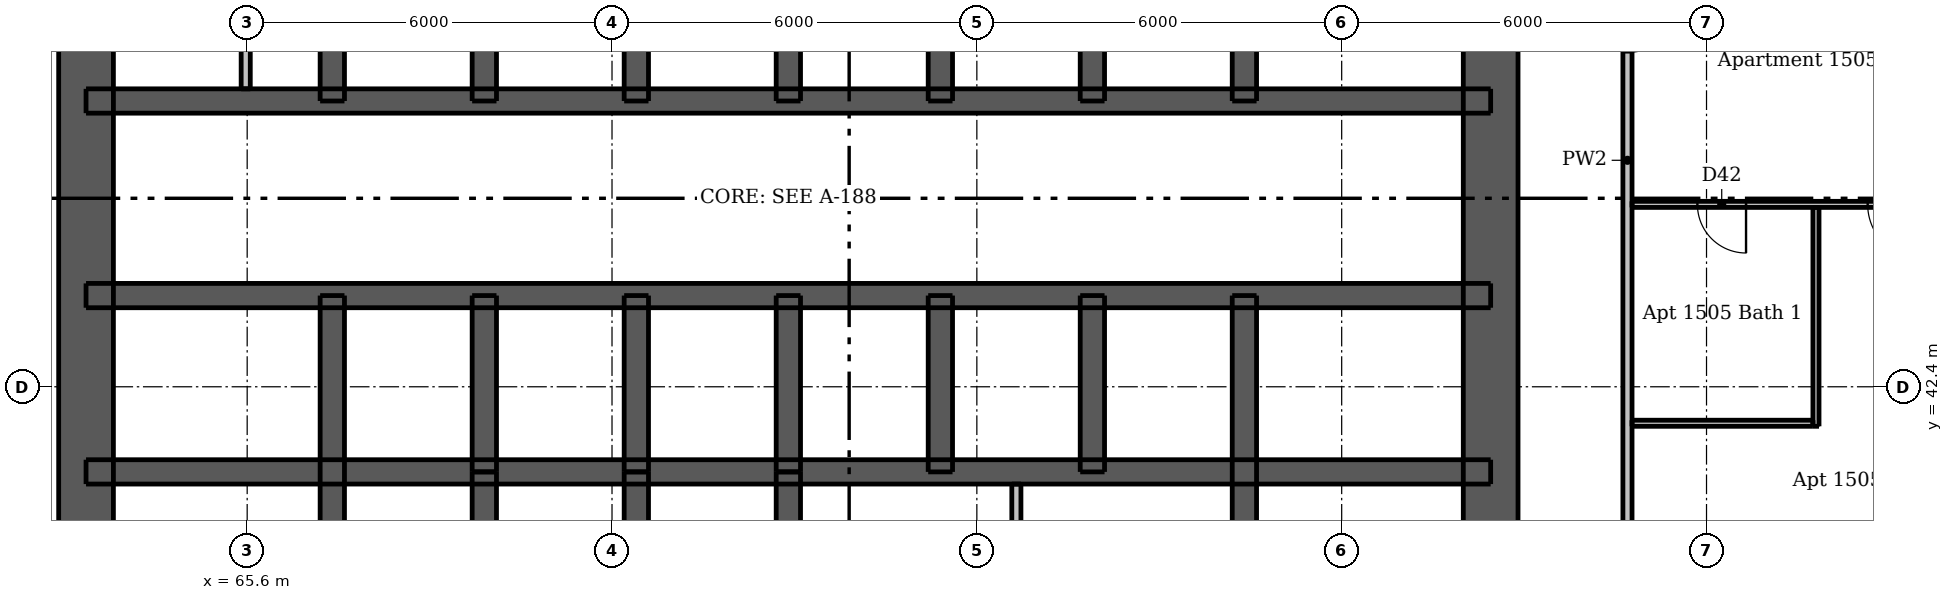
"""IFC4 building model, lengths in metres.
Left out: names, types, materials, properties, quantities, classifications, styles, units other than length and angle.
Written with IfcOpenShell. Run it as: python <this file> out.ifc"""

import sys

from ifc_helpers import new_model, si_unit, direction, frame, frame_2d, origin, place, context, subcontext, project, spatial, rectangle, extrude, element, fill, save


model = new_model("IFC4")
c1 = context("Model", 3, precision=1e-05, world=origin(), true_north=direction((0.0, 1.0)))
c2 = subcontext(c1, "Body", "Model", "MODEL_VIEW")
j1 = project(units=[si_unit("LENGTHUNIT", "METRE"), si_unit("PLANEANGLEUNIT", "RADIAN")], contexts=[c1])
p1 = place(None, origin())
s1 = spatial("IfcSite", under=j1, at=p1, CompositionType="ELEMENT")
p2 = place(p1, origin())
s2 = spatial("IfcBuilding", under=s1, at=p2, CompositionType="ELEMENT")
p3 = place(p2, frame((0.0, 0.0, 56.5)))
s3 = spatial("IfcBuildingStorey", under=s2, at=p3, CompositionType="ELEMENT", Elevation=56.5)
p4 = place(p3, frame((62.95, 33.5, 0.0), z_axis=(0.0, 0.0, 1.0), x_axis=(0.0, 1.0, 0.0)))
e1 = element("IfcWall", 1, at=p4, inside=s3, PredefinedType="SHEAR", context=c2, shape_type="SweptSolid", body=[
    extrude(rectangle(XDim=24.0, YDim=0.9, at=frame_2d((12.0, 0.0))), origin(), (0.0, 0.0, 1.0), 3.05),
])
p5 = place(p4, frame((11.2, 0.0, 0.0)))
e2 = element("IfcOpeningElement", 2, at=p5, cuts=e1, PredefinedType="OPENING", context=c2, shape_type="SweptSolid", body=[
    extrude(rectangle(XDim=1.6, YDim=2.1, at=frame_2d((0.8, 1.05))), frame((0.0, 0.46, 0.0), z_axis=(0.0, -1.0, 0.0), x_axis=(1.0, 0.0, 0.0)), (0.0, 0.0, 1.0), 0.92),
])
p6 = place(p3, frame((86.05, 33.5, 0.0), z_axis=(0.0, 0.0, 1.0), x_axis=(0.0, 1.0, 0.0)))
e3 = element("IfcWall", 3, at=p6, inside=s3, PredefinedType="SHEAR", context=c2, shape_type="SweptSolid", body=[
    extrude(rectangle(XDim=24.0, YDim=0.9, at=frame_2d((12.0, 0.0))), origin(), (0.0, 0.0, 1.0), 3.05),
])
p7 = place(p6, frame((11.2, 0.0, 0.0)))
e4 = element("IfcOpeningElement", 4, at=p7, cuts=e3, PredefinedType="OPENING", context=c2, shape_type="SweptSolid", body=[
    extrude(rectangle(XDim=1.6, YDim=2.1, at=frame_2d((0.8, 1.05))), frame((0.0, 0.46, 0.0), z_axis=(0.0, -1.0, 0.0), x_axis=(1.0, 0.0, 0.0)), (0.0, 0.0, 1.0), 0.92),
])
p8 = place(p3, frame((62.95, 41.0, 0.0), z_axis=(0.0, 0.0, 1.0), x_axis=(1.0, 0.0, 0.0)))
e5 = element("IfcWall", 5, at=p8, inside=s3, PredefinedType="SHEAR", context=c2, shape_type="SweptSolid", body=[
    extrude(rectangle(XDim=23.1, YDim=0.4, at=frame_2d((11.55, 0.0))), origin(), (0.0, 0.0, 1.0), 3.05),
])
p9 = place(p3, frame((62.95, 43.9, 0.0), z_axis=(0.0, 0.0, 1.0), x_axis=(1.0, 0.0, 0.0)))
e6 = element("IfcWall", 6, at=p9, inside=s3, PredefinedType="SHEAR", context=c2, shape_type="SweptSolid", body=[
    extrude(rectangle(XDim=23.1, YDim=0.4, at=frame_2d((11.55, 0.0))), origin(), (0.0, 0.0, 1.0), 3.05),
])
p10 = place(p9, frame((1.7, 0.0, 0.0)))
e7 = element("IfcOpeningElement", 7, at=p10, cuts=e6, PredefinedType="OPENING", context=c2, shape_type="SweptSolid", body=[
    extrude(rectangle(XDim=0.9, YDim=2.1, at=frame_2d((0.45, 1.05))), frame((0.0, 0.21, 0.0), z_axis=(0.0, -1.0, 0.0), x_axis=(1.0, 0.0, 0.0)), (0.0, 0.0, 1.0), 0.42),
])
p11 = place(p9, frame((20.5, 0.0, 0.0)))
e8 = element("IfcOpeningElement", 8, at=p11, cuts=e6, PredefinedType="OPENING", context=c2, shape_type="SweptSolid", body=[
    extrude(rectangle(XDim=0.9, YDim=2.1, at=frame_2d((0.45, 1.05))), frame((0.0, 0.21, 0.0), z_axis=(0.0, -1.0, 0.0), x_axis=(1.0, 0.0, 0.0)), (0.0, 0.0, 1.0), 0.42),
])
p12 = place(p9, frame((4.75, 0.0, 0.0)))
e9 = element("IfcOpeningElement", 9, at=p12, cuts=e6, PredefinedType="OPENING", context=c2, shape_type="SweptSolid", body=[
    extrude(rectangle(XDim=1.1, YDim=2.1, at=frame_2d((0.55, 1.05))), frame((0.0, 0.21, 0.0), z_axis=(0.0, -1.0, 0.0), x_axis=(1.0, 0.0, 0.0)), (0.0, 0.0, 1.0), 0.42),
])
p13 = place(p9, frame((7.25, 0.0, 0.0)))
e10 = element("IfcOpeningElement", 10, at=p13, cuts=e6, PredefinedType="OPENING", context=c2, shape_type="SweptSolid", body=[
    extrude(rectangle(XDim=1.1, YDim=2.1, at=frame_2d((0.55, 1.05))), frame((0.0, 0.21, 0.0), z_axis=(0.0, -1.0, 0.0), x_axis=(1.0, 0.0, 0.0)), (0.0, 0.0, 1.0), 0.42),
])
p14 = place(p9, frame((9.75, 0.0, 0.0)))
e11 = element("IfcOpeningElement", 11, at=p14, cuts=e6, PredefinedType="OPENING", context=c2, shape_type="SweptSolid", body=[
    extrude(rectangle(XDim=1.1, YDim=2.1, at=frame_2d((0.55, 1.05))), frame((0.0, 0.21, 0.0), z_axis=(0.0, -1.0, 0.0), x_axis=(1.0, 0.0, 0.0)), (0.0, 0.0, 1.0), 0.42),
])
p15 = place(p9, frame((12.25, 0.0, 0.0)))
e12 = element("IfcOpeningElement", 12, at=p15, cuts=e6, PredefinedType="OPENING", context=c2, shape_type="SweptSolid", body=[
    extrude(rectangle(XDim=1.1, YDim=2.1, at=frame_2d((0.55, 1.05))), frame((0.0, 0.21, 0.0), z_axis=(0.0, -1.0, 0.0), x_axis=(1.0, 0.0, 0.0)), (0.0, 0.0, 1.0), 0.42),
])
p16 = place(p9, frame((14.75, 0.0, 0.0)))
e13 = element("IfcOpeningElement", 13, at=p16, cuts=e6, PredefinedType="OPENING", context=c2, shape_type="SweptSolid", body=[
    extrude(rectangle(XDim=1.1, YDim=2.1, at=frame_2d((0.55, 1.05))), frame((0.0, 0.21, 0.0), z_axis=(0.0, -1.0, 0.0), x_axis=(1.0, 0.0, 0.0)), (0.0, 0.0, 1.0), 0.42),
])
p17 = place(p9, frame((17.25, 0.0, 0.0)))
e14 = element("IfcOpeningElement", 14, at=p17, cuts=e6, PredefinedType="OPENING", context=c2, shape_type="SweptSolid", body=[
    extrude(rectangle(XDim=1.1, YDim=2.1, at=frame_2d((0.55, 1.05))), frame((0.0, 0.21, 0.0), z_axis=(0.0, -1.0, 0.0), x_axis=(1.0, 0.0, 0.0)), (0.0, 0.0, 1.0), 0.42),
])
p18 = place(p3, frame((62.95, 47.1, 0.0), z_axis=(0.0, 0.0, 1.0), x_axis=(1.0, 0.0, 0.0)))
e15 = element("IfcWall", 15, at=p18, inside=s3, PredefinedType="SHEAR", context=c2, shape_type="SweptSolid", body=[
    extrude(rectangle(XDim=23.1, YDim=0.4, at=frame_2d((11.55, 0.0))), origin(), (0.0, 0.0, 1.0), 3.05),
])
p19 = place(p18, frame((1.088, 0.0, 0.0)))
e16 = element("IfcOpeningElement", 16, at=p19, cuts=e15, PredefinedType="OPENING", context=c2, shape_type="SweptSolid", body=[
    extrude(rectangle(XDim=0.9, YDim=2.1, at=frame_2d((0.45, 1.05))), frame((0.0, 0.21, 0.0), z_axis=(0.0, -1.0, 0.0), x_axis=(1.0, 0.0, 0.0)), (0.0, 0.0, 1.0), 0.42),
])
p20 = place(p18, frame((2.838, 0.0, 0.0)))
e17 = element("IfcOpeningElement", 17, at=p20, cuts=e15, PredefinedType="OPENING", context=c2, shape_type="SweptSolid", body=[
    extrude(rectangle(XDim=0.8, YDim=2.1, at=frame_2d((0.4, 1.05))), frame((0.0, 0.21, 0.0), z_axis=(0.0, -1.0, 0.0), x_axis=(1.0, 0.0, 0.0)), (0.0, 0.0, 1.0), 0.42),
])
p21 = place(p18, frame((20.5, 0.0, 0.0)))
e18 = element("IfcOpeningElement", 18, at=p21, cuts=e15, PredefinedType="OPENING", context=c2, shape_type="SweptSolid", body=[
    extrude(rectangle(XDim=0.9, YDim=2.1, at=frame_2d((0.45, 1.05))), frame((0.0, 0.21, 0.0), z_axis=(0.0, -1.0, 0.0), x_axis=(1.0, 0.0, 0.0)), (0.0, 0.0, 1.0), 0.42),
])
p22 = place(p3, frame((67.0, 33.95, 0.0), z_axis=(0.0, 0.0, 1.0), x_axis=(0.0, 1.0, 0.0)))
e19 = element("IfcWall", 19, at=p22, inside=s3, PredefinedType="SHEAR", context=c2, shape_type="SweptSolid", body=[
    extrude(rectangle(XDim=9.95, YDim=0.4, at=frame_2d((4.975, 0.0))), origin(), (0.0, 0.0, 1.0), 3.05),
])
p23 = place(p22, frame((0.65, 0.0, 0.0)))
e20 = element("IfcOpeningElement", 20, at=p23, cuts=e19, PredefinedType="OPENING", context=c2, shape_type="SweptSolid", body=[
    extrude(rectangle(XDim=1.1, YDim=2.1, at=frame_2d((0.55, 1.05))), frame((0.0, 0.21, 0.0), z_axis=(0.0, -1.0, 0.0), x_axis=(1.0, 0.0, 0.0)), (0.0, 0.0, 1.0), 0.42),
])
for number, where, z_axis, x_axis in (
    (21, (67.0, 47.1, 0.0), (0.0, 0.0, 1.0), (0.0, 1.0, 0.0)),
    (22, (82.0, 33.95, 0.0), (0.0, 0.0, 1.0), (0.0, 1.0, 0.0)),
    (23, (82.0, 47.1, 0.0), (0.0, 0.0, 1.0), (0.0, 1.0, 0.0)),
):
    element("IfcWall", number, at=place(p3, frame(where, z_axis=z_axis, x_axis=x_axis)), inside=s3, PredefinedType="SHEAR", context=c2, shape_type="SweptSolid", body=[
        extrude(rectangle(XDim=9.95, YDim=0.4, at=frame_2d((4.975, 0.0))), origin(), (0.0, 0.0, 1.0), 3.05),
    ])
for number, where, z_axis, x_axis in (
    (24, (69.5, 41.0, 0.0), (0.0, 0.0, 1.0), (0.0, 1.0, 0.0)),
    (25, (69.5, 47.1, 0.0), (0.0, 0.0, 1.0), (0.0, 1.0, 0.0)),
    (26, (72.0, 41.0, 0.0), (0.0, 0.0, 1.0), (0.0, 1.0, 0.0)),
    (27, (72.0, 47.1, 0.0), (0.0, 0.0, 1.0), (0.0, 1.0, 0.0)),
    (28, (74.5, 41.0, 0.0), (0.0, 0.0, 1.0), (0.0, 1.0, 0.0)),
    (29, (74.5, 47.1, 0.0), (0.0, 0.0, 1.0), (0.0, 1.0, 0.0)),
    (30, (77.0, 41.0, 0.0), (0.0, 0.0, 1.0), (0.0, 1.0, 0.0)),
    (31, (77.0, 47.1, 0.0), (0.0, 0.0, 1.0), (0.0, 1.0, 0.0)),
    (32, (79.5, 41.0, 0.0), (0.0, 0.0, 1.0), (0.0, 1.0, 0.0)),
    (33, (79.5, 47.1, 0.0), (0.0, 0.0, 1.0), (0.0, 1.0, 0.0)),
    (34, (69.5, 38.1, 0.0), (0.0, 0.0, 1.0), (0.0, 1.0, 0.0)),
    (35, (72.0, 38.1, 0.0), (0.0, 0.0, 1.0), (0.0, 1.0, 0.0)),
    (36, (74.5, 38.1, 0.0), (0.0, 0.0, 1.0), (0.0, 1.0, 0.0)),
):
    element("IfcWall", number, at=place(p3, frame(where, z_axis=z_axis, x_axis=x_axis)), inside=s3, PredefinedType="SHEAR", context=c2, shape_type="SweptSolid", body=[
        extrude(rectangle(XDim=2.9, YDim=0.4, at=frame_2d((1.45, 0.0))), origin(), (0.0, 0.0, 1.0), 3.05),
    ])
p24 = place(p3, frame((78.25, 34.4, 0.0), z_axis=(0.0, 0.0, 1.0), x_axis=(0.0, 1.0, 0.0)))
e37 = element("IfcWall", 37, at=p24, inside=s3, PredefinedType="PLUMBINGWALL", context=c2, shape_type="SweptSolid", body=[
    extrude(rectangle(XDim=6.4, YDim=0.15, at=frame_2d((3.2, 0.0))), origin(), (0.0, 0.0, 1.0), 3.05),
])
p25 = place(p3, frame((65.576, 47.3, 0.0), z_axis=(0.0, 0.0, 1.0), x_axis=(0.0, 1.0, 0.0)))
e38 = element("IfcWall", 38, at=p25, inside=s3, PredefinedType="PLUMBINGWALL", context=c2, shape_type="SweptSolid", body=[
    extrude(rectangle(XDim=2.5, YDim=0.15, at=frame_2d((1.25, 0.0))), origin(), (0.0, 0.0, 1.0), 3.05),
])
p26 = place(p3, frame((91.4, 41.75, 0.0), z_axis=(0.0, 0.0, 1.0), x_axis=(0.0, 1.0, 0.0)))
e39 = element("IfcWall", 39, at=p26, inside=s3, PredefinedType="PARTITIONING", context=c2, shape_type="SweptSolid", body=[
    extrude(rectangle(XDim=3.6, YDim=0.1, at=frame_2d((1.8, 0.0))), origin(), (0.0, 0.0, 1.0), 3.05),
])
p27 = place(p3, frame((94.0, 45.4, 0.0), z_axis=(0.0, 0.0, 1.0), x_axis=(-1.0, 0.0, 0.0)))
e40 = element("IfcWall", 40, at=p27, inside=s3, PredefinedType="PARTITIONING", context=c2, shape_type="SweptSolid", body=[
    extrude(rectangle(XDim=5.625, YDim=0.1, at=frame_2d((2.812, 0.0))), origin(), (0.0, 0.0, 1.0), 3.05),
])
p28 = place(p27, frame((0.85, 0.0, 0.0)))
e41 = element("IfcOpeningElement", 41, at=p28, cuts=e40, PredefinedType="OPENING", context=c2, shape_type="SweptSolid", body=[
    extrude(rectangle(XDim=0.9, YDim=2.1, at=frame_2d((0.45, 1.05))), frame((0.0, 0.06, 0.0), z_axis=(0.0, -1.0, 0.0), x_axis=(1.0, 0.0, 0.0)), (0.0, 0.0, 1.0), 0.12),
])
p29 = place(p27, frame((3.75, 0.0, 0.0)))
e42 = element("IfcOpeningElement", 42, at=p29, cuts=e40, PredefinedType="OPENING", context=c2, shape_type="SweptSolid", body=[
    extrude(rectangle(XDim=0.8, YDim=2.1, at=frame_2d((0.4, 1.05))), frame((0.0, 0.06, 0.0), z_axis=(0.0, -1.0, 0.0), x_axis=(1.0, 0.0, 0.0)), (0.0, 0.0, 1.0), 0.12),
])
p30 = place(p3, frame((88.375, 41.8, 0.0), z_axis=(0.0, 0.0, 1.0), x_axis=(1.0, 0.0, 0.0)))
e43 = element("IfcWall", 43, at=p30, inside=s3, PredefinedType="PARTITIONING", context=c2, shape_type="SweptSolid", body=[
    extrude(rectangle(XDim=2.975, YDim=0.1, at=frame_2d((1.488, 0.0))), origin(), (0.0, 0.0, 1.0), 3.05),
])
p31 = place(p3, frame((88.3, 60.475, 0.0), z_axis=(0.0, 0.0, 1.0), x_axis=(0.0, -1.0, 0.0)))
e44 = element("IfcWall", 44, at=p31, inside=s3, PredefinedType="PARTITIONING", context=c2, shape_type="SweptSolid", body=[
    extrude(rectangle(XDim=28.7, YDim=0.15, at=frame_2d((14.35, 0.0))), origin(), (0.0, 0.0, 1.0), 3.05),
])
p32 = place(p31, frame((27.425, 0.0, 0.0)))
e45 = element("IfcOpeningElement", 45, at=p32, cuts=e44, PredefinedType="OPENING", context=c2, shape_type="SweptSolid", body=[
    extrude(rectangle(XDim=1.0, YDim=2.1, at=frame_2d((0.5, 1.05))), frame((0.0, 0.085, 0.0), z_axis=(0.0, -1.0, 0.0), x_axis=(1.0, 0.0, 0.0)), (0.0, 0.0, 1.0), 0.17),
])
p33 = place(p31, frame((11.575, 0.0, 0.0)))
e46 = element("IfcOpeningElement", 46, at=p33, cuts=e44, PredefinedType="OPENING", context=c2, shape_type="SweptSolid", body=[
    extrude(rectangle(XDim=1.0, YDim=2.1, at=frame_2d((0.5, 1.05))), frame((0.0, 0.085, 0.0), z_axis=(0.0, -1.0, 0.0), x_axis=(1.0, 0.0, 0.0)), (0.0, 0.0, 1.0), 0.17),
])
p34 = place(p31, frame((2.575, 0.0, 0.0)))
e47 = element("IfcOpeningElement", 47, at=p34, cuts=e44, PredefinedType="OPENING", context=c2, shape_type="SweptSolid", body=[
    extrude(rectangle(XDim=1.0, YDim=2.1, at=frame_2d((0.5, 1.05))), frame((0.0, 0.085, 0.0), z_axis=(0.0, -1.0, 0.0), x_axis=(1.0, 0.0, 0.0)), (0.0, 0.0, 1.0), 0.17),
])
p35 = place(p5, origin())
e48 = element("IfcDoor", 48, at=p35, inside=s3, OperationType="DOUBLE_DOOR_SINGLE_SWING", PredefinedType="DOOR", context=c2, shape_type="SweptSolid", body=[
    extrude(rectangle(XDim=1.6, YDim=2.1, at=frame_2d((0.8, 1.05))), frame((0.0, -0.388, 0.0), z_axis=(0.0, -1.0, 0.0), x_axis=(1.0, 0.0, 0.0)), (0.0, 0.0, 1.0), 0.05),
])
fill(e2, e48)
p36 = place(p7, origin())
e49 = element("IfcDoor", 49, at=p36, inside=s3, OperationType="DOUBLE_DOOR_SINGLE_SWING", PredefinedType="DOOR", context=c2, shape_type="SweptSolid", body=[
    extrude(rectangle(XDim=1.6, YDim=2.1, at=frame_2d((0.8, 1.05))), frame((0.0, 0.438, 0.0), z_axis=(0.0, -1.0, 0.0), x_axis=(1.0, 0.0, 0.0)), (0.0, 0.0, 1.0), 0.05),
])
fill(e4, e49)
p37 = place(p10, origin())
e50 = element("IfcDoor", 50, at=p37, inside=s3, OperationType="SINGLE_SWING_LEFT", PredefinedType="DOOR", context=c2, shape_type="SweptSolid", body=[
    extrude(rectangle(XDim=0.9, YDim=2.1, at=frame_2d((0.45, 1.05))), frame((0.0, -0.138, 0.0), z_axis=(0.0, -1.0, 0.0), x_axis=(1.0, 0.0, 0.0)), (0.0, 0.0, 1.0), 0.05),
])
fill(e7, e50)
p38 = place(p11, origin())
e51 = element("IfcDoor", 51, at=p38, inside=s3, OperationType="SINGLE_SWING_LEFT", PredefinedType="DOOR", context=c2, shape_type="SweptSolid", body=[
    extrude(rectangle(XDim=0.9, YDim=2.1, at=frame_2d((0.45, 1.05))), frame((0.0, -0.138, 0.0), z_axis=(0.0, -1.0, 0.0), x_axis=(1.0, 0.0, 0.0)), (0.0, 0.0, 1.0), 0.05),
])
fill(e8, e51)
p39 = place(p19, origin())
e52 = element("IfcDoor", 52, at=p39, inside=s3, OperationType="SINGLE_SWING_LEFT", PredefinedType="DOOR", context=c2, shape_type="SweptSolid", body=[
    extrude(rectangle(XDim=0.9, YDim=2.1, at=frame_2d((0.45, 1.05))), frame((0.0, 0.188, 0.0), z_axis=(0.0, -1.0, 0.0), x_axis=(1.0, 0.0, 0.0)), (0.0, 0.0, 1.0), 0.05),
])
fill(e16, e52)
p40 = place(p20, origin())
e53 = element("IfcDoor", 53, at=p40, inside=s3, OperationType="SINGLE_SWING_RIGHT", PredefinedType="DOOR", context=c2, shape_type="SweptSolid", body=[
    extrude(rectangle(XDim=0.8, YDim=2.1, at=frame_2d((0.4, 1.05))), frame((0.0, 0.188, 0.0), z_axis=(0.0, -1.0, 0.0), x_axis=(1.0, 0.0, 0.0)), (0.0, 0.0, 1.0), 0.05),
])
fill(e17, e53)
p41 = place(p21, origin())
e54 = element("IfcDoor", 54, at=p41, inside=s3, OperationType="SINGLE_SWING_LEFT", PredefinedType="DOOR", context=c2, shape_type="SweptSolid", body=[
    extrude(rectangle(XDim=0.9, YDim=2.1, at=frame_2d((0.45, 1.05))), frame((0.0, 0.188, 0.0), z_axis=(0.0, -1.0, 0.0), x_axis=(1.0, 0.0, 0.0)), (0.0, 0.0, 1.0), 0.05),
])
fill(e18, e54)
p42 = place(p12, origin())
e55 = element("IfcDoor", 55, at=p42, inside=s3, OperationType="DOUBLE_DOOR_SLIDING", PredefinedType="DOOR", context=c2, shape_type="SweptSolid", body=[
    extrude(rectangle(XDim=1.1, YDim=2.1, at=frame_2d((0.55, 1.05))), frame((0.0, 0.025, 0.0), z_axis=(0.0, -1.0, 0.0), x_axis=(1.0, 0.0, 0.0)), (0.0, 0.0, 1.0), 0.05),
])
fill(e9, e55)
p43 = place(p13, origin())
e56 = element("IfcDoor", 56, at=p43, inside=s3, OperationType="DOUBLE_DOOR_SLIDING", PredefinedType="DOOR", context=c2, shape_type="SweptSolid", body=[
    extrude(rectangle(XDim=1.1, YDim=2.1, at=frame_2d((0.55, 1.05))), frame((0.0, 0.025, 0.0), z_axis=(0.0, -1.0, 0.0), x_axis=(1.0, 0.0, 0.0)), (0.0, 0.0, 1.0), 0.05),
])
fill(e10, e56)
p44 = place(p14, origin())
e57 = element("IfcDoor", 57, at=p44, inside=s3, OperationType="DOUBLE_DOOR_SLIDING", PredefinedType="DOOR", context=c2, shape_type="SweptSolid", body=[
    extrude(rectangle(XDim=1.1, YDim=2.1, at=frame_2d((0.55, 1.05))), frame((0.0, 0.025, 0.0), z_axis=(0.0, -1.0, 0.0), x_axis=(1.0, 0.0, 0.0)), (0.0, 0.0, 1.0), 0.05),
])
fill(e11, e57)
p45 = place(p15, origin())
e58 = element("IfcDoor", 58, at=p45, inside=s3, OperationType="DOUBLE_DOOR_SLIDING", PredefinedType="DOOR", context=c2, shape_type="SweptSolid", body=[
    extrude(rectangle(XDim=1.1, YDim=2.1, at=frame_2d((0.55, 1.05))), frame((0.0, 0.025, 0.0), z_axis=(0.0, -1.0, 0.0), x_axis=(1.0, 0.0, 0.0)), (0.0, 0.0, 1.0), 0.05),
])
fill(e12, e58)
p46 = place(p16, origin())
e59 = element("IfcDoor", 59, at=p46, inside=s3, OperationType="DOUBLE_DOOR_SLIDING", PredefinedType="DOOR", context=c2, shape_type="SweptSolid", body=[
    extrude(rectangle(XDim=1.1, YDim=2.1, at=frame_2d((0.55, 1.05))), frame((0.0, 0.025, 0.0), z_axis=(0.0, -1.0, 0.0), x_axis=(1.0, 0.0, 0.0)), (0.0, 0.0, 1.0), 0.05),
])
fill(e13, e59)
p47 = place(p17, origin())
e60 = element("IfcDoor", 60, at=p47, inside=s3, OperationType="DOUBLE_DOOR_SLIDING", PredefinedType="DOOR", context=c2, shape_type="SweptSolid", body=[
    extrude(rectangle(XDim=1.1, YDim=2.1, at=frame_2d((0.55, 1.05))), frame((0.0, 0.025, 0.0), z_axis=(0.0, -1.0, 0.0), x_axis=(1.0, 0.0, 0.0)), (0.0, 0.0, 1.0), 0.05),
])
fill(e14, e60)
p48 = place(p28, origin())
e61 = element("IfcDoor", 61, at=p48, inside=s3, OperationType="SINGLE_SWING_LEFT", PredefinedType="DOOR", context=c2, shape_type="SweptSolid", body=[
    extrude(rectangle(XDim=0.9, YDim=2.1, at=frame_2d((0.45, 1.05))), frame((0.0, 0.025, 0.0), z_axis=(0.0, -1.0, 0.0), x_axis=(1.0, 0.0, 0.0)), (0.0, 0.0, 1.0), 0.05),
])
fill(e41, e61)
p49 = place(p29, origin())
e62 = element("IfcDoor", 62, at=p49, inside=s3, OperationType="SINGLE_SWING_LEFT", PredefinedType="DOOR", context=c2, shape_type="SweptSolid", body=[
    extrude(rectangle(XDim=0.8, YDim=2.1, at=frame_2d((0.4, 1.05))), frame((0.0, 0.025, 0.0), z_axis=(0.0, -1.0, 0.0), x_axis=(1.0, 0.0, 0.0)), (0.0, 0.0, 1.0), 0.05),
])
fill(e42, e62)
save(model, sys.argv[1])
